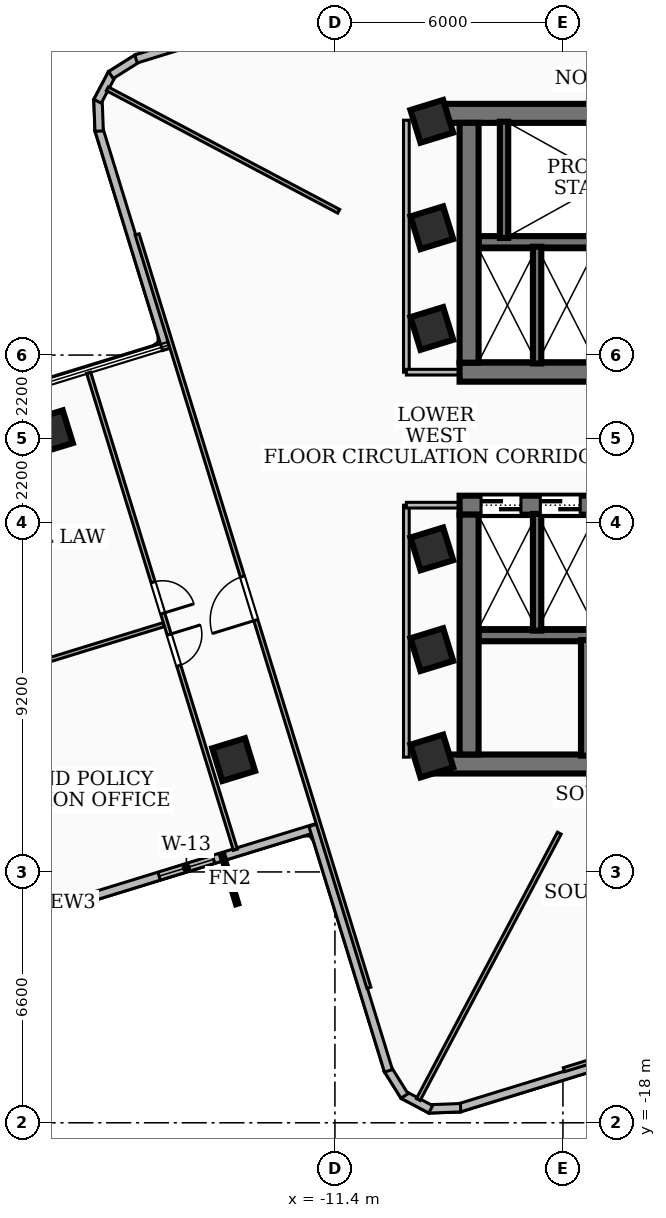
"""IFC4 building model, lengths in metres.
Left out: names, types, materials, properties, quantities, classifications, styles, units other than length and angle.
Written with IfcOpenShell. Run it as: python <this file> out.ifc"""

import sys

from ifc_helpers import new_model, si_unit, direction, frame, frame_2d, origin, origin_2d, place, context, subcontext, project, spatial, rectangle, extrude, element, fill, save


model = new_model("IFC4")
c1 = context("Model", 3, precision=1e-05, world=origin(), true_north=direction((0.0, 1.0)))
c2 = subcontext(c1, "Body", "Model", "MODEL_VIEW")
j1 = project(units=[si_unit("LENGTHUNIT", "METRE"), si_unit("PLANEANGLEUNIT", "RADIAN")], contexts=[c1])
p1 = place(None, origin())
s1 = spatial("IfcSite", under=j1, at=p1, CompositionType="ELEMENT")
p2 = place(p1, origin())
s2 = spatial("IfcBuilding", under=s1, at=p2, CompositionType="ELEMENT")
p3 = place(p2, frame((0.0, 0.0, 148.68)))
s3 = spatial("IfcBuildingStorey", under=s2, at=p3, CompositionType="ELEMENT", Elevation=148.68)
p4 = place(p3, frame((-8.78, 8.56, 0.0), z_axis=(0.0, 0.0, 1.0), x_axis=(1.0, 0.0, 0.0)))
e1 = element("IfcWall", 1, at=p4, inside=s3, PredefinedType="SHEAR", context=c2, shape_type="SweptSolid", body=[
    extrude(rectangle(XDim=17.56, YDim=0.5, at=frame_2d((8.78, 0.0))), origin(), (0.0, 0.0, 1.0), 3.32),
])
p5 = place(p3, frame((8.12, 1.75, 0.0), z_axis=(0.0, 0.0, 1.0), x_axis=(-1.0, 0.0, 0.0)))
e2 = element("IfcWall", 2, at=p5, inside=s3, PredefinedType="SHEAR", context=c2, shape_type="SweptSolid", body=[
    extrude(rectangle(XDim=16.24, YDim=0.5, at=frame_2d((8.12, 0.0))), origin(), (0.0, 0.0, 1.0), 3.32),
])
p6 = place(p5, frame((7.45, 0.0, 0.0)))
e3 = element("IfcOpeningElement", 3, at=p6, cuts=e2, PredefinedType="OPENING", context=c2, shape_type="SweptSolid", body=[
    extrude(rectangle(XDim=1.0, YDim=2.1, at=frame_2d((0.5, 1.05))), frame((0.0, 0.26, 0.0), z_axis=(0.0, -1.0, 0.0), x_axis=(1.0, 0.0, 0.0)), (0.0, 0.0, 1.0), 0.52),
])
p7 = place(p5, frame((3.4, 0.0, 0.0)))
e4 = element("IfcOpeningElement", 4, at=p7, cuts=e2, PredefinedType="OPENING", context=c2, shape_type="SweptSolid", body=[
    extrude(rectangle(XDim=0.9, YDim=2.06, at=frame_2d((0.45, 1.03))), frame((0.0, 0.26, 0.0), z_axis=(0.0, -1.0, 0.0), x_axis=(1.0, 0.0, 0.0)), (0.0, 0.0, 1.0), 0.52),
])
p8 = place(p5, frame((1.1, 0.0, 0.0)))
e5 = element("IfcOpeningElement", 5, at=p8, cuts=e2, PredefinedType="OPENING", context=c2, shape_type="SweptSolid", body=[
    extrude(rectangle(XDim=0.9, YDim=2.06, at=frame_2d((0.45, 1.03))), frame((0.0, 0.26, 0.0), z_axis=(0.0, -1.0, 0.0), x_axis=(1.0, 0.0, 0.0)), (0.0, 0.0, 1.0), 0.52),
])
p9 = place(p3, frame((-7.87, 2.0, 0.0), z_axis=(0.0, 0.0, 1.0), x_axis=(0.0, 1.0, 0.0)))
e6 = element("IfcWall", 6, at=p9, inside=s3, PredefinedType="SHEAR", context=c2, shape_type="SweptSolid", body=[
    extrude(rectangle(XDim=6.31, YDim=0.5, at=frame_2d((3.155, 0.0))), origin(), (0.0, 0.0, 1.0), 3.32),
])
p10 = place(p3, frame((7.62, 5.18, 0.0), z_axis=(0.0, 0.0, 1.0), x_axis=(-1.0, 0.0, 0.0)))
e7 = element("IfcWall", 7, at=p10, inside=s3, PredefinedType="SOLIDWALL", context=c2, shape_type="SweptSolid", body=[
    extrude(rectangle(XDim=15.24, YDim=0.3, at=frame_2d((7.62, 0.0))), origin(), (0.0, 0.0, 1.0), 3.32),
])
p11 = place(p10, frame((5.77, 0.0, 0.0)))
e8 = element("IfcOpeningElement", 8, at=p11, cuts=e7, PredefinedType="OPENING", context=c2, shape_type="SweptSolid", body=[
    extrude(rectangle(XDim=1.1, YDim=2.15, at=frame_2d((0.55, 1.075))), frame((0.0, 0.16, 0.0), z_axis=(0.0, -1.0, 0.0), x_axis=(1.0, 0.0, 0.0)), (0.0, 0.0, 1.0), 0.32),
])
p12 = place(p10, frame((2.97, 0.0, 0.0)))
e9 = element("IfcOpeningElement", 9, at=p12, cuts=e7, PredefinedType="OPENING", context=c2, shape_type="SweptSolid", body=[
    extrude(rectangle(XDim=1.1, YDim=2.15, at=frame_2d((0.55, 1.075))), frame((0.0, 0.16, 0.0), z_axis=(0.0, -1.0, 0.0), x_axis=(1.0, 0.0, 0.0)), (0.0, 0.0, 1.0), 0.32),
])
p13 = place(p10, frame((7.97, 0.0, 0.0)))
e10 = element("IfcOpeningElement", 10, at=p13, cuts=e7, PredefinedType="OPENING", context=c2, shape_type="SweptSolid", body=[
    extrude(rectangle(XDim=1.0, YDim=2.1, at=frame_2d((0.5, 1.05))), frame((0.0, 0.16, 0.0), z_axis=(0.0, -1.0, 0.0), x_axis=(1.0, 0.0, 0.0)), (0.0, 0.0, 1.0), 0.32),
])
p14 = place(p3, frame((8.78, -8.56, 0.0), z_axis=(0.0, 0.0, 1.0), x_axis=(-1.0, 0.0, 0.0)))
e11 = element("IfcWall", 11, at=p14, inside=s3, PredefinedType="SHEAR", context=c2, shape_type="SweptSolid", body=[
    extrude(rectangle(XDim=17.56, YDim=0.5, at=frame_2d((8.78, 0.0))), origin(), (0.0, 0.0, 1.0), 3.32),
])
p15 = place(p3, frame((-8.12, -1.75, 0.0), z_axis=(0.0, 0.0, 1.0), x_axis=(1.0, 0.0, 0.0)))
e12 = element("IfcWall", 12, at=p15, inside=s3, PredefinedType="SHEAR", context=c2, shape_type="SweptSolid", body=[
    extrude(rectangle(XDim=16.24, YDim=0.5, at=frame_2d((8.12, 0.0))), origin(), (0.0, 0.0, 1.0), 3.32),
])
p16 = place(p15, frame((7.45, 0.0, 0.0)))
e13 = element("IfcOpeningElement", 13, at=p16, cuts=e12, PredefinedType="OPENING", context=c2, shape_type="SweptSolid", body=[
    extrude(rectangle(XDim=1.0, YDim=2.1, at=frame_2d((0.5, 1.05))), frame((0.0, 0.26, 0.0), z_axis=(0.0, -1.0, 0.0), x_axis=(1.0, 0.0, 0.0)), (0.0, 0.0, 1.0), 0.52),
])
p17 = place(p15, frame((12.65, 0.0, 0.0)))
e14 = element("IfcOpeningElement", 14, at=p17, cuts=e12, PredefinedType="OPENING", context=c2, shape_type="SweptSolid", body=[
    extrude(rectangle(XDim=0.9, YDim=2.06, at=frame_2d((0.45, 1.03))), frame((0.0, 0.26, 0.0), z_axis=(0.0, -1.0, 0.0), x_axis=(1.0, 0.0, 0.0)), (0.0, 0.0, 1.0), 0.52),
])
p18 = place(p15, frame((0.565, 0.0, 0.0)))
e15 = element("IfcOpeningElement", 15, at=p18, cuts=e12, PredefinedType="OPENING", context=c2, shape_type="SweptSolid", body=[
    extrude(rectangle(XDim=1.05, YDim=2.15, at=frame_2d((0.525, 1.075))), frame((0.0, 0.26, 0.0), z_axis=(0.0, -1.0, 0.0), x_axis=(1.0, 0.0, 0.0)), (0.0, 0.0, 1.0), 0.52),
])
p19 = place(p15, frame((2.125, 0.0, 0.0)))
e16 = element("IfcOpeningElement", 16, at=p19, cuts=e12, PredefinedType="OPENING", context=c2, shape_type="SweptSolid", body=[
    extrude(rectangle(XDim=1.05, YDim=2.15, at=frame_2d((0.525, 1.075))), frame((0.0, 0.26, 0.0), z_axis=(0.0, -1.0, 0.0), x_axis=(1.0, 0.0, 0.0)), (0.0, 0.0, 1.0), 0.52),
])
p20 = place(p15, frame((3.685, 0.0, 0.0)))
e17 = element("IfcOpeningElement", 17, at=p20, cuts=e12, PredefinedType="OPENING", context=c2, shape_type="SweptSolid", body=[
    extrude(rectangle(XDim=1.05, YDim=2.15, at=frame_2d((0.525, 1.075))), frame((0.0, 0.26, 0.0), z_axis=(0.0, -1.0, 0.0), x_axis=(1.0, 0.0, 0.0)), (0.0, 0.0, 1.0), 0.52),
])
p21 = place(p3, frame((-7.87, -8.31, 0.0), z_axis=(0.0, 0.0, 1.0), x_axis=(0.0, 1.0, 0.0)))
e18 = element("IfcWall", 18, at=p21, inside=s3, PredefinedType="SHEAR", context=c2, shape_type="SweptSolid", body=[
    extrude(rectangle(XDim=6.31, YDim=0.5, at=frame_2d((3.155, 0.0))), origin(), (0.0, 0.0, 1.0), 3.32),
])
p22 = place(p3, frame((-7.62, -5.18, 0.0), z_axis=(0.0, 0.0, 1.0), x_axis=(1.0, 0.0, 0.0)))
e19 = element("IfcWall", 19, at=p22, inside=s3, PredefinedType="SOLIDWALL", context=c2, shape_type="SweptSolid", body=[
    extrude(rectangle(XDim=15.24, YDim=0.3, at=frame_2d((7.62, 0.0))), origin(), (0.0, 0.0, 1.0), 3.32),
])
p23 = place(p22, frame((5.77, 0.0, 0.0)))
e20 = element("IfcOpeningElement", 20, at=p23, cuts=e19, PredefinedType="OPENING", context=c2, shape_type="SweptSolid", body=[
    extrude(rectangle(XDim=1.1, YDim=2.15, at=frame_2d((0.55, 1.075))), frame((0.0, 0.16, 0.0), z_axis=(0.0, -1.0, 0.0), x_axis=(1.0, 0.0, 0.0)), (0.0, 0.0, 1.0), 0.32),
])
p24 = place(p22, frame((7.97, 0.0, 0.0)))
e21 = element("IfcOpeningElement", 21, at=p24, cuts=e19, PredefinedType="OPENING", context=c2, shape_type="SweptSolid", body=[
    extrude(rectangle(XDim=1.0, YDim=2.1, at=frame_2d((0.5, 1.05))), frame((0.0, 0.16, 0.0), z_axis=(0.0, -1.0, 0.0), x_axis=(1.0, 0.0, 0.0)), (0.0, 0.0, 1.0), 0.32),
])
p25 = place(p3, frame((-6.95, 5.28, 0.0), z_axis=(0.0, 0.0, 1.0), x_axis=(0.0, 1.0, 0.0)))
e22 = element("IfcWall", 22, at=p25, inside=s3, PredefinedType="SOLIDWALL", context=c2, shape_type="SweptSolid", body=[
    extrude(rectangle(XDim=3.06, YDim=0.22, at=frame_2d((1.53, 0.0))), origin(), (0.0, 0.0, 1.0), 3.32),
])
p26 = place(p3, frame((-4.8, -8.34, 0.0), z_axis=(0.0, 0.0, 1.0), x_axis=(0.0, 1.0, 0.0)))
e23 = element("IfcWall", 23, at=p26, inside=s3, PredefinedType="SOLIDWALL", context=c2, shape_type="SweptSolid", body=[
    extrude(rectangle(XDim=3.04, YDim=0.25, at=frame_2d((1.52, 0.0))), origin(), (0.0, 0.0, 1.0), 3.32),
])
for number, where, z_axis, x_axis in (
    (24, (-6.08, 1.98, 0.0), (0.0, 0.0, 1.0), (0.0, 1.0, 0.0)),
    (25, (-6.08, -5.05, 0.0), (0.0, 0.0, 1.0), (0.0, 1.0, 0.0)),
):
    element("IfcWall", number, at=place(p3, frame(where, z_axis=z_axis, x_axis=x_axis)), inside=s3, PredefinedType="SOLIDWALL", context=c2, shape_type="SweptSolid", body=[
        extrude(rectangle(XDim=3.07, YDim=0.22, at=frame_2d((1.535, 0.0))), origin(), (0.0, 0.0, 1.0), 3.32),
    ])
for number, where, z_axis, x_axis in (
    (26, (-8.85, -5.55, 0.0), (0.0, 0.0, 1.0), (0.956, 0.294, 0.0)),
    (27, (-8.85, -2.9, 0.0), (0.0, 0.0, 1.0), (0.956, 0.294, 0.0)),
    (28, (-8.85, 2.9, 0.0), (0.0, 0.0, 1.0), (0.956, 0.294, 0.0)),
    (29, (-8.85, 5.55, 0.0), (0.0, 0.0, 1.0), (0.956, 0.294, 0.0)),
    (30, (-8.85, 8.35, 0.0), (0.0, 0.0, 1.0), (0.956, 0.294, 0.0)),
    (31, (-8.85, -8.35, 0.0), (0.0, 0.0, 1.0), (0.956, 0.294, 0.0)),
    (32, (-18.86, 0.183, 0.0), (0.0, 0.0, 1.0), (0.956, 0.294, 0.0)),
    (33, (-14.064, -8.445, 0.0), (0.0, 0.0, 1.0), (0.956, 0.294, 0.0)),
):
    element("IfcColumn", number, at=place(p3, frame(where, z_axis=z_axis, x_axis=x_axis)), inside=s3, PredefinedType="COLUMN", context=c2, shape_type="SweptSolid", body=[
        extrude(rectangle(XDim=0.9, YDim=0.9, at=origin_2d()), origin(), (0.0, 0.0, 1.0), 3.6),
    ])
p27 = place(p3, frame((-11.868, -10.232, 0.0), z_axis=(0.0, 0.0, 1.0), x_axis=(-0.955802538335, -0.29400936671, 0.0)))
e34 = element("IfcWall", 34, at=p27, inside=s3, PredefinedType="SOLIDWALL", context=c2, shape_type="SweptSolid", body=[
    extrude(rectangle(XDim=13.459, YDim=0.22, at=frame_2d((6.729, 0.0))), origin(), (0.0, 0.0, 1.0), 3.32),
])
p28 = place(p27, frame((2.85, 0.0, 0.85)))
e35 = element("IfcOpeningElement", 35, at=p28, cuts=e34, PredefinedType="OPENING", context=c2, shape_type="SweptSolid", body=[
    extrude(rectangle(XDim=1.5, YDim=1.8, at=frame_2d((0.75, 0.9))), frame((0.0, 0.12, 0.0), z_axis=(0.0, -1.0, 0.0), x_axis=(1.0, 0.0, 0.0)), (0.0, 0.0, 1.0), 0.24),
])
p29 = place(p3, frame((-15.831, 2.351, 0.0), z_axis=(0.0, 0.0, 1.0), x_axis=(-0.293958424126, 0.955818207028, 0.0)))
e36 = element("IfcWall", 36, at=p29, inside=s3, PredefinedType="SOLIDWALL", context=c2, shape_type="SweptSolid", body=[
    extrude(rectangle(XDim=6.059, YDim=0.22, at=frame_2d((3.029, 0.0))), origin(), (0.0, 0.0, 1.0), 3.32),
])
p30 = place(p3, frame((-17.604, 8.093, 0.0), z_axis=(0.0, 0.0, 1.0), x_axis=(-0.037195813461, 0.999307996296, 0.0)))
e37 = element("IfcWall", 37, at=p30, inside=s3, PredefinedType="SOLIDWALL", context=c2, shape_type="SweptSolid", body=[
    extrude(rectangle(XDim=0.833, YDim=0.22, at=frame_2d((0.417, 0.0))), origin(), (0.0, 0.0, 1.0), 3.32),
])
p31 = place(p3, frame((-17.646, 8.879, 0.0), z_axis=(0.0, 0.0, 1.0), x_axis=(0.46853080902, 0.883447158012, 0.0)))
e38 = element("IfcWall", 38, at=p31, inside=s3, PredefinedType="SOLIDWALL", context=c2, shape_type="SweptSolid", body=[
    extrude(rectangle(XDim=0.82, YDim=0.22, at=frame_2d((0.41, 0.0))), origin(), (0.0, 0.0, 1.0), 3.32),
])
p32 = place(p3, frame((-17.295, 9.568, 0.0), z_axis=(0.0, 0.0, 1.0), x_axis=(0.847058721529, 0.531499315411, 0.0)))
e39 = element("IfcWall", 39, at=p32, inside=s3, PredefinedType="SOLIDWALL", context=c2, shape_type="SweptSolid", body=[
    extrude(rectangle(XDim=0.833, YDim=0.22, at=frame_2d((0.417, 0.0))), origin(), (0.0, 0.0, 1.0), 3.32),
])
p33 = place(p3, frame((-16.634, 9.991, 0.0), z_axis=(0.0, 0.0, 1.0), x_axis=(0.955804779036, 0.294002082259, 0.0)))
e40 = element("IfcWall", 40, at=p33, inside=s3, PredefinedType="SOLIDWALL", context=c2, shape_type="SweptSolid", body=[
    extrude(rectangle(XDim=6.759, YDim=0.22, at=frame_2d((3.379, 0.0))), origin(), (0.0, 0.0, 1.0), 3.32),
])
p34 = place(p3, frame((-2.351, -15.831, 0.0), z_axis=(0.0, 0.0, 1.0), x_axis=(-0.955818207028, -0.293958424126, 0.0)))
e41 = element("IfcWall", 41, at=p34, inside=s3, PredefinedType="SOLIDWALL", context=c2, shape_type="SweptSolid", body=[
    extrude(rectangle(XDim=6.059, YDim=0.22, at=frame_2d((3.029, 0.0))), origin(), (0.0, 0.0, 1.0), 2.55),
])
p35 = place(p3, frame((-8.093, -17.604, 0.0), z_axis=(0.0, 0.0, 1.0), x_axis=(-0.999307996296, -0.037195813461, 0.0)))
e42 = element("IfcWall", 42, at=p35, inside=s3, PredefinedType="SOLIDWALL", context=c2, shape_type="SweptSolid", body=[
    extrude(rectangle(XDim=0.833, YDim=0.22, at=frame_2d((0.417, 0.0))), origin(), (0.0, 0.0, 1.0), 3.32),
])
p36 = place(p3, frame((-8.879, -17.646, 0.0), z_axis=(0.0, 0.0, 1.0), x_axis=(-0.883447158012, 0.46853080902, 0.0)))
e43 = element("IfcWall", 43, at=p36, inside=s3, PredefinedType="SOLIDWALL", context=c2, shape_type="SweptSolid", body=[
    extrude(rectangle(XDim=0.82, YDim=0.22, at=frame_2d((0.41, 0.0))), origin(), (0.0, 0.0, 1.0), 3.32),
])
p37 = place(p3, frame((-9.568, -17.295, 0.0), z_axis=(0.0, 0.0, 1.0), x_axis=(-0.531499315411, 0.847058721529, 0.0)))
e44 = element("IfcWall", 44, at=p37, inside=s3, PredefinedType="SOLIDWALL", context=c2, shape_type="SweptSolid", body=[
    extrude(rectangle(XDim=0.833, YDim=0.22, at=frame_2d((0.417, 0.0))), origin(), (0.0, 0.0, 1.0), 3.32),
])
p38 = place(p3, frame((-9.991, -16.634, 0.0), z_axis=(0.0, 0.0, 1.0), x_axis=(-0.294002082259, 0.955804779036, 0.0)))
e45 = element("IfcWall", 45, at=p38, inside=s3, PredefinedType="SOLIDWALL", context=c2, shape_type="SweptSolid", body=[
    extrude(rectangle(XDim=6.759, YDim=0.22, at=frame_2d((3.379, 0.0))), origin(), (0.0, 0.0, 1.0), 3.32),
])
p39 = place(p3, frame((-9.52, 1.75, 0.0), z_axis=(0.0, 0.0, 1.0), x_axis=(0.0, 1.0, 0.0)))
e46 = element("IfcWall", 46, at=p39, inside=s3, PredefinedType="PARTITIONING", context=c2, shape_type="SweptSolid", body=[
    extrude(rectangle(XDim=6.63, YDim=0.15, at=frame_2d((3.315, 0.0))), origin(), (0.0, 0.0, 1.0), 2.55),
])
p40 = place(p3, frame((-7.85, 1.75, 0.0), z_axis=(0.0, 0.0, 1.0), x_axis=(-1.0, 0.0, 0.0)))
e47 = element("IfcWall", 47, at=p40, inside=s3, PredefinedType="PARTITIONING", context=c2, shape_type="SweptSolid", body=[
    extrude(rectangle(XDim=1.67, YDim=0.15, at=frame_2d((0.835, 0.0))), origin(), (0.0, 0.0, 1.0), 2.55),
])
p41 = place(p3, frame((-9.52, -8.38, 0.0), z_axis=(0.0, 0.0, 1.0), x_axis=(0.0, 1.0, 0.0)))
e48 = element("IfcWall", 48, at=p41, inside=s3, PredefinedType="PARTITIONING", context=c2, shape_type="SweptSolid", body=[
    extrude(rectangle(XDim=6.63, YDim=0.15, at=frame_2d((3.315, 0.0))), origin(), (0.0, 0.0, 1.0), 2.55),
])
p42 = place(p3, frame((-7.85, -1.75, 0.0), z_axis=(0.0, 0.0, 1.0), x_axis=(-1.0, 0.0, 0.0)))
e49 = element("IfcWall", 49, at=p42, inside=s3, PredefinedType="PARTITIONING", context=c2, shape_type="SweptSolid", body=[
    extrude(rectangle(XDim=1.67, YDim=0.15, at=frame_2d((0.835, 0.0))), origin(), (0.0, 0.0, 1.0), 2.55),
])
p43 = place(p3, frame((-11.3, 5.983, 0.0), z_axis=(0.0, 0.0, 1.0), x_axis=(-0.883779295194, 0.467904004457, 0.0)))
e50 = element("IfcWall", 50, at=p43, inside=s3, PredefinedType="PARTITIONING", context=c2, shape_type="SweptSolid", body=[
    extrude(rectangle(XDim=6.888, YDim=0.11, at=frame_2d((3.444, 0.0))), origin(), (0.0, 0.0, 1.0), 3.32),
])
p44 = place(p3, frame((-5.495, -10.38, 0.0), z_axis=(0.0, 0.0, 1.0), x_axis=(-0.467965518706, -0.883746724635, 0.0)))
e51 = element("IfcWall", 51, at=p44, inside=s3, PredefinedType="PARTITIONING", context=c2, shape_type="SweptSolid", body=[
    extrude(rectangle(XDim=7.93, YDim=0.11, at=frame_2d((3.965, 0.0))), origin(), (0.0, 0.0, 1.0), 2.55),
])
p45 = place(p3, frame((-10.506, -14.447, 0.0), z_axis=(0.0, 0.0, 1.0), x_axis=(-0.294033732643, 0.955795042919, 0.0)))
e52 = element("IfcWall", 52, at=p45, inside=s3, PredefinedType="PARTITIONING", context=c2, shape_type="SweptSolid", body=[
    extrude(rectangle(XDim=20.739, YDim=0.11, at=frame_2d((10.369, 0.0))), origin(), (0.0, 0.0, 1.0), 2.55),
])
p46 = place(p45, frame((10.12, 0.0, 0.0)))
e53 = element("IfcOpeningElement", 53, at=p46, cuts=e52, PredefinedType="OPENING", context=c2, shape_type="SweptSolid", body=[
    extrude(rectangle(XDim=1.2, YDim=2.1, at=frame_2d((0.6, 1.05))), frame((0.0, 0.065, 0.0), z_axis=(0.0, -1.0, 0.0), x_axis=(1.0, 0.0, 0.0)), (0.0, 0.0, 1.0), 0.13),
])
p47 = place(p3, frame((-15.904, -4.893, 0.0), z_axis=(0.0, 0.0, 1.0), x_axis=(-0.955787709154, -0.294057570944, 0.0)))
e54 = element("IfcWall", 54, at=p47, inside=s3, PredefinedType="PARTITIONING", context=c2, shape_type="SweptSolid", body=[
    extrude(rectangle(XDim=9.1, YDim=0.11, at=frame_2d((4.55, 0.0))), origin(), (0.0, 0.0, 1.0), 2.812),
])
p48 = place(p3, frame((-17.88, 1.734, 0.0), z_axis=(0.0, 0.0, 1.0), x_axis=(0.293994377882, -0.95580714884, 0.0)))
e55 = element("IfcWall", 55, at=p48, inside=s3, PredefinedType="PARTITIONING", context=c2, shape_type="SweptSolid", body=[
    extrude(rectangle(XDim=13.129, YDim=0.11, at=frame_2d((6.564, 0.0))), origin(), (0.0, 0.0, 1.0), 2.55),
])
p49 = place(p48, frame((5.765, 0.0, 0.0)))
e56 = element("IfcOpeningElement", 56, at=p49, cuts=e55, PredefinedType="OPENING", context=c2, shape_type="SweptSolid", body=[
    extrude(rectangle(XDim=0.86, YDim=2.04, at=frame_2d((0.43, 1.02))), frame((0.0, 0.065, 0.0), z_axis=(0.0, -1.0, 0.0), x_axis=(1.0, 0.0, 0.0)), (0.0, 0.0, 1.0), 0.13),
])
p50 = place(p48, frame((7.205, 0.0, 0.0)))
e57 = element("IfcOpeningElement", 57, at=p50, cuts=e55, PredefinedType="OPENING", context=c2, shape_type="SweptSolid", body=[
    extrude(rectangle(XDim=0.86, YDim=2.04, at=frame_2d((0.43, 1.02))), frame((0.0, 0.065, 0.0), z_axis=(0.0, -1.0, 0.0), x_axis=(1.0, 0.0, 0.0)), (0.0, 0.0, 1.0), 0.13),
])
p51 = place(p3, frame((14.447, -10.506, 0.0), z_axis=(0.0, 0.0, 1.0), x_axis=(-0.955795042919, -0.294033732643, 0.0)))
e58 = element("IfcWall", 58, at=p51, inside=s3, PredefinedType="PARTITIONING", context=c2, shape_type="SweptSolid", body=[
    extrude(rectangle(XDim=20.739, YDim=0.11, at=frame_2d((10.369, 0.0))), origin(), (0.0, 0.0, 1.0), 2.55),
])
p52 = place(p51, frame((10.12, 0.0, 0.0)))
e59 = element("IfcOpeningElement", 59, at=p52, cuts=e58, PredefinedType="OPENING", context=c2, shape_type="SweptSolid", body=[
    extrude(rectangle(XDim=1.2, YDim=2.1, at=frame_2d((0.6, 1.05))), frame((0.0, 0.065, 0.0), z_axis=(0.0, -1.0, 0.0), x_axis=(1.0, 0.0, 0.0)), (0.0, 0.0, 1.0), 0.13),
])
p53 = place(p28, origin())
e60 = element("IfcWindow", 60, at=p53, inside=s3, PartitioningType="SINGLE_PANEL", PredefinedType="WINDOW", context=c2, shape_type="SweptSolid", body=[
    extrude(rectangle(XDim=1.5, YDim=1.8, at=frame_2d((0.75, 0.9))), frame((0.0, 0.03, 0.0), z_axis=(0.0, -1.0, 0.0), x_axis=(1.0, 0.0, 0.0)), (0.0, 0.0, 1.0), 0.06),
])
fill(e35, e60)
p54 = place(p18, origin())
e61 = element("IfcDoor", 61, at=p54, inside=s3, OperationType="DOUBLE_DOOR_SLIDING", PredefinedType="DOOR", context=c2, shape_type="SweptSolid", body=[
    extrude(rectangle(XDim=1.05, YDim=2.15, at=frame_2d((0.525, 1.075))), frame((0.0, 0.025, 0.0), z_axis=(0.0, -1.0, 0.0), x_axis=(1.0, 0.0, 0.0)), (0.0, 0.0, 1.0), 0.05),
])
fill(e15, e61)
p55 = place(p19, origin())
e62 = element("IfcDoor", 62, at=p55, inside=s3, OperationType="DOUBLE_DOOR_SLIDING", PredefinedType="DOOR", context=c2, shape_type="SweptSolid", body=[
    extrude(rectangle(XDim=1.05, YDim=2.15, at=frame_2d((0.525, 1.075))), frame((0.0, 0.025, 0.0), z_axis=(0.0, -1.0, 0.0), x_axis=(1.0, 0.0, 0.0)), (0.0, 0.0, 1.0), 0.05),
])
fill(e16, e62)
p56 = place(p46, origin())
e63 = element("IfcDoor", 63, at=p56, inside=s3, OperationType="SINGLE_SWING_LEFT", PredefinedType="DOOR", context=c2, shape_type="SweptSolid", body=[
    extrude(rectangle(XDim=1.2, YDim=2.1, at=frame_2d((0.6, 1.05))), frame((0.0, 0.025, 0.0), z_axis=(0.0, -1.0, 0.0), x_axis=(1.0, 0.0, 0.0)), (0.0, 0.0, 1.0), 0.05),
])
fill(e53, e63)
p57 = place(p49, origin())
e64 = element("IfcDoor", 64, at=p57, inside=s3, OperationType="SINGLE_SWING_RIGHT", PredefinedType="DOOR", context=c2, shape_type="SweptSolid", body=[
    extrude(rectangle(XDim=0.86, YDim=2.04, at=frame_2d((0.43, 1.02))), frame((0.0, 0.025, 0.0), z_axis=(0.0, -1.0, 0.0), x_axis=(1.0, 0.0, 0.0)), (0.0, 0.0, 1.0), 0.05),
])
fill(e56, e64)
p58 = place(p50, origin())
e65 = element("IfcDoor", 65, at=p58, inside=s3, OperationType="SINGLE_SWING_LEFT", PredefinedType="DOOR", context=c2, shape_type="SweptSolid", body=[
    extrude(rectangle(XDim=0.86, YDim=2.04, at=frame_2d((0.43, 1.02))), frame((0.0, 0.025, 0.0), z_axis=(0.0, -1.0, 0.0), x_axis=(1.0, 0.0, 0.0)), (0.0, 0.0, 1.0), 0.05),
])
fill(e57, e65)
save(model, sys.argv[1])
